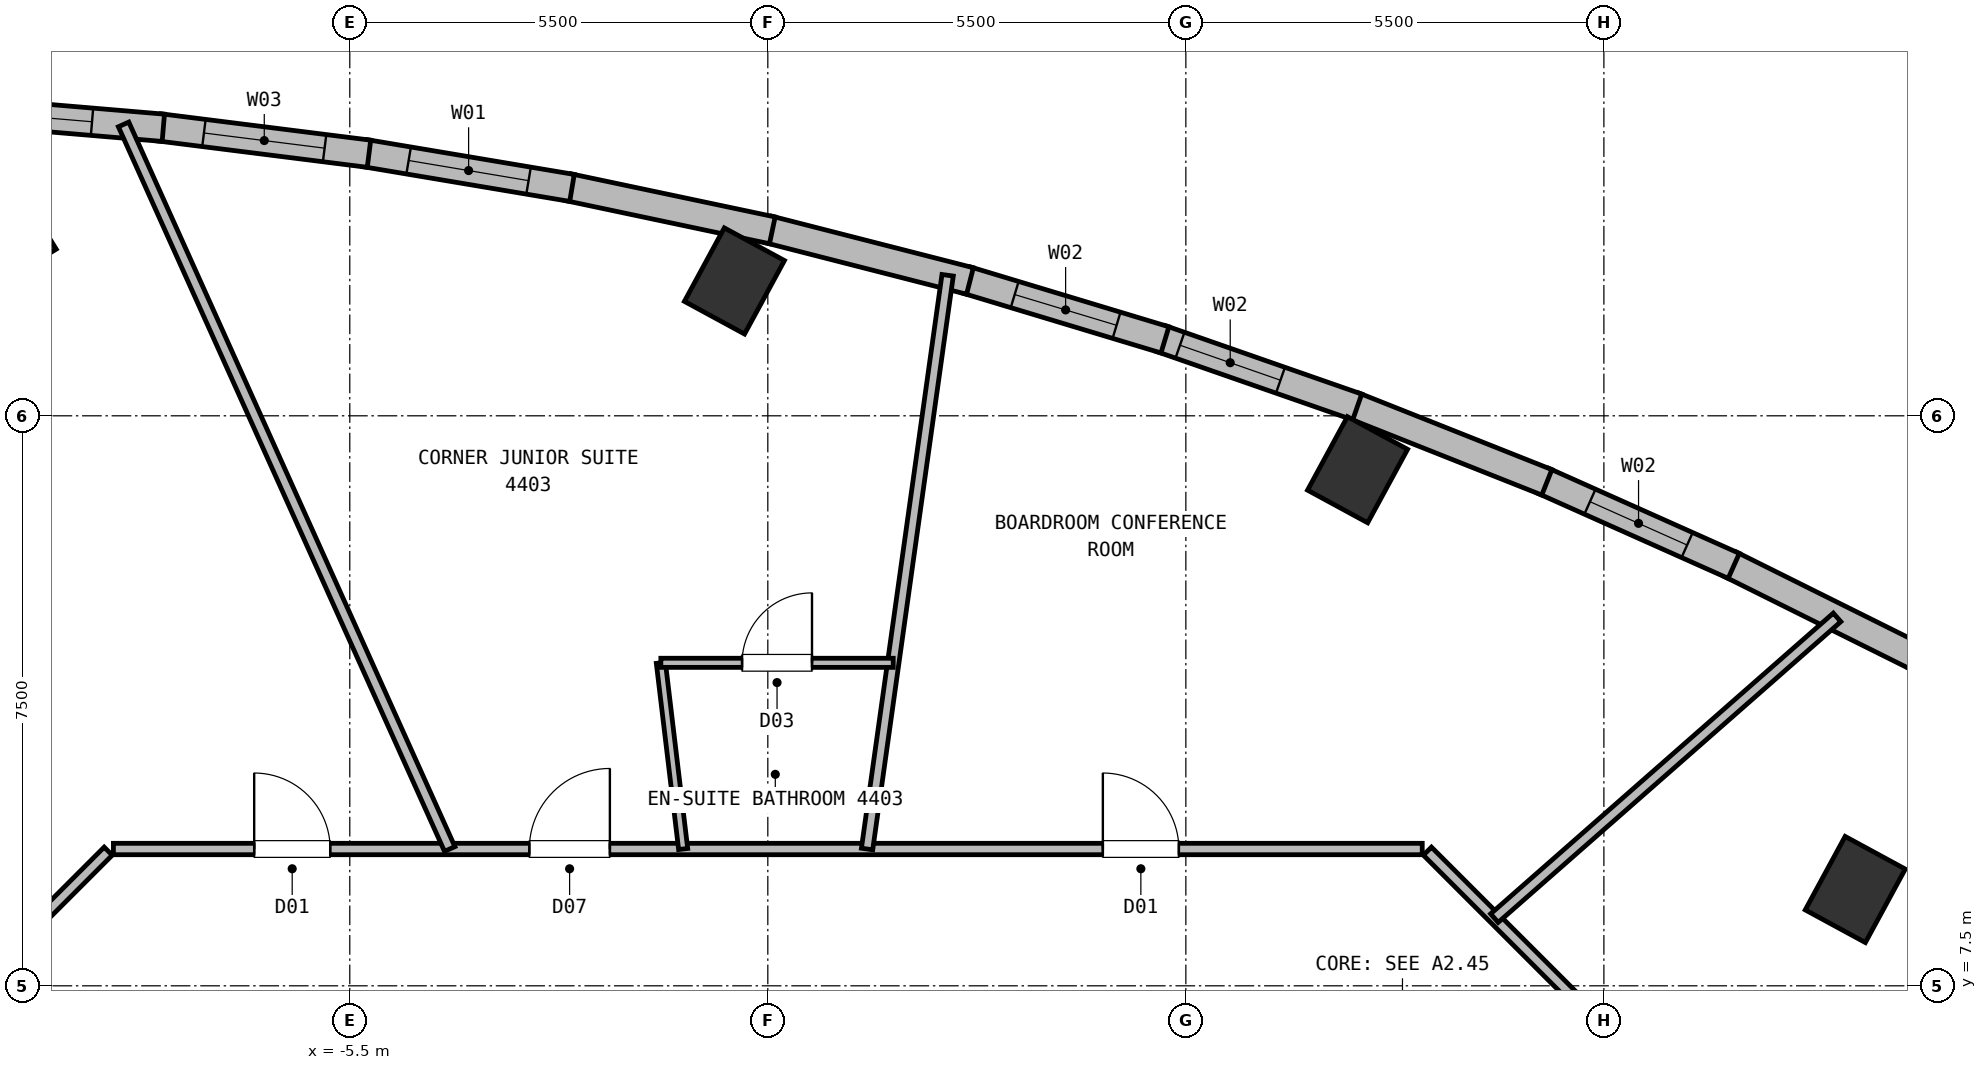
"""IFC4 building model, lengths in metres.
Left out: names, types, materials, properties, quantities, classifications, styles, units other than length and angle.
Written with IfcOpenShell. Run it as: python <this file> out.ifc"""

import sys

from ifc_helpers import new_model, si_unit, direction, frame, frame_2d, origin, origin_2d, place, context, subcontext, project, spatial, rectangle, extrude, element, fill, save


model = new_model("IFC4")
c1 = context("Model", 3, precision=1e-05, world=origin(), true_north=direction((0.0, 1.0)))
c2 = subcontext(c1, "Body", "Model", "MODEL_VIEW")
j1 = project(units=[si_unit("LENGTHUNIT", "METRE"), si_unit("PLANEANGLEUNIT", "RADIAN")], contexts=[c1])
p1 = place(None, origin())
s1 = spatial("IfcSite", under=j1, at=p1, CompositionType="ELEMENT")
p2 = place(p1, origin())
s2 = spatial("IfcBuilding", under=s1, at=p2, CompositionType="ELEMENT")
p3 = place(p2, frame((0.0, 0.0, 164.75)))
s3 = spatial("IfcBuildingStorey", under=s2, at=p3, CompositionType="ELEMENT", Elevation=164.75)
p4 = place(p3, frame((-10.633, 17.352, 0.0), z_axis=(0.0, 0.0, 1.0), x_axis=(-0.522498564716, 0.852640164354, 0.0)))
e1 = element("IfcColumn", 1, at=p4, inside=s3, PredefinedType="COLUMN", context=c2, shape_type="SweptSolid", body=[
    extrude(rectangle(XDim=1.6, YDim=2.0, at=origin_2d()), origin(), (0.0, 0.0, 1.0), 3.75),
])
for number, where, z_axis, x_axis in (
    (2, (14.307, 8.767, 0.0), (0.0, 0.0, 1.0), (-0.879, 0.477, 0.0)),
    (3, (7.759, 14.29, 0.0), (0.0, 0.0, 1.0), (-0.879, 0.477, 0.0)),
    (4, (-0.439, 16.774, 0.0), (0.0, 0.0, 1.0), (-0.879, 0.477, 0.0)),
):
    element("IfcColumn", number, at=place(p3, frame(where, z_axis=z_axis, x_axis=x_axis)), inside=s3, PredefinedType="COLUMN", context=c2, shape_type="SweptSolid", body=[
        extrude(rectangle(XDim=0.9, YDim=1.1, at=origin_2d()), origin(), (0.0, 0.0, 1.0), 3.75),
    ])
p5 = place(p3, frame((12.664, 13.047, 0.0), z_axis=(0.0, 0.0, 1.0), x_axis=(0.89522231214, -0.445619806389, 0.0)))
e5 = element("IfcWall", 5, at=p5, inside=s3, PredefinedType="SOLIDWALL", context=c2, shape_type="SweptSolid", body=[
    extrude(rectangle(XDim=2.759, YDim=0.36, at=frame_2d((1.379, 0.0))), origin(), (0.0, 0.0, 1.0), 3.44),
])
p6 = place(p3, frame((10.203, 14.144, 0.0), z_axis=(0.0, 0.0, 1.0), x_axis=(0.913079911719, -0.407780669987, 0.0)))
e6 = element("IfcWall", 6, at=p6, inside=s3, PredefinedType="SOLIDWALL", context=c2, shape_type="SweptSolid", body=[
    extrude(rectangle(XDim=2.744, YDim=0.36, at=frame_2d((1.372, 0.0))), origin(), (0.0, 0.0, 1.0), 3.44),
])
p7 = place(p6, frame((0.672, 0.0, 0.72)))
e7 = element("IfcOpeningElement", 7, at=p7, cuts=e6, PredefinedType="OPENING", context=c2, shape_type="SweptSolid", body=[
    extrude(rectangle(XDim=1.4, YDim=1.84, at=frame_2d((0.7, 0.92))), frame((0.0, 0.19, 0.0), z_axis=(0.0, -1.0, 0.0), x_axis=(1.0, 0.0, 0.0)), (0.0, 0.0, 1.0), 0.38),
])
p8 = place(p3, frame((7.708, 15.134, 0.0), z_axis=(0.0, 0.0, 1.0), x_axis=(0.929489253477, -0.368849193671, 0.0)))
e8 = element("IfcWall", 8, at=p8, inside=s3, PredefinedType="SOLIDWALL", context=c2, shape_type="SweptSolid", body=[
    extrude(rectangle(XDim=2.734, YDim=0.36, at=frame_2d((1.367, 0.0))), origin(), (0.0, 0.0, 1.0), 3.44),
])
p9 = place(p3, frame((5.177, 16.015, 0.0), z_axis=(0.0, 0.0, 1.0), x_axis=(0.944274551396, -0.329158885018, 0.0)))
e9 = element("IfcWall", 9, at=p9, inside=s3, PredefinedType="SOLIDWALL", context=c2, shape_type="SweptSolid", body=[
    extrude(rectangle(XDim=2.729, YDim=0.36, at=frame_2d((1.365, 0.0))), origin(), (0.0, 0.0, 1.0), 3.44),
])
p10 = place(p9, frame((0.26, 0.0, 0.72)))
e10 = element("IfcOpeningElement", 10, at=p10, cuts=e9, PredefinedType="OPENING", context=c2, shape_type="SweptSolid", body=[
    extrude(rectangle(XDim=1.4, YDim=1.84, at=frame_2d((0.7, 0.92))), frame((0.0, 0.19, 0.0), z_axis=(0.0, -1.0, 0.0), x_axis=(1.0, 0.0, 0.0)), (0.0, 0.0, 1.0), 0.38),
])
p11 = place(p3, frame((2.612, 16.787, 0.0), z_axis=(0.0, 0.0, 1.0), x_axis=(0.957404258556, -0.288750905972, 0.0)))
e11 = element("IfcWall", 11, at=p11, inside=s3, PredefinedType="SOLIDWALL", context=c2, shape_type="SweptSolid", body=[
    extrude(rectangle(XDim=2.729, YDim=0.36, at=frame_2d((1.365, 0.0))), origin(), (0.0, 0.0, 1.0), 3.44),
])
p12 = place(p11, frame((0.665, 0.0, 0.72)))
e12 = element("IfcOpeningElement", 12, at=p12, cuts=e11, PredefinedType="OPENING", context=c2, shape_type="SweptSolid", body=[
    extrude(rectangle(XDim=1.4, YDim=1.84, at=frame_2d((0.7, 0.92))), frame((0.0, 0.19, 0.0), z_axis=(0.0, -1.0, 0.0), x_axis=(1.0, 0.0, 0.0)), (0.0, 0.0, 1.0), 0.38),
])
p13 = place(p3, frame((0.01, 17.452, 0.0), z_axis=(0.0, 0.0, 1.0), x_axis=(0.968799214678, -0.247846891526, 0.0)))
e13 = element("IfcWall", 13, at=p13, inside=s3, PredefinedType="SOLIDWALL", context=c2, shape_type="SweptSolid", body=[
    extrude(rectangle(XDim=2.734, YDim=0.36, at=frame_2d((1.367, 0.0))), origin(), (0.0, 0.0, 1.0), 3.44),
])
p14 = place(p3, frame((-2.625, 18.008, 0.0), z_axis=(0.0, 0.0, 1.0), x_axis=(0.978369100094, -0.20686687502, 0.0)))
e14 = element("IfcWall", 14, at=p14, inside=s3, PredefinedType="SOLIDWALL", context=c2, shape_type="SweptSolid", body=[
    extrude(rectangle(XDim=2.744, YDim=0.36, at=frame_2d((1.372, 0.0))), origin(), (0.0, 0.0, 1.0), 3.44),
])
p15 = place(p3, frame((-5.297, 18.455, 0.0), z_axis=(0.0, 0.0, 1.0), x_axis=(0.986180213116, -0.16567615175, 0.0)))
e15 = element("IfcWall", 15, at=p15, inside=s3, PredefinedType="SOLIDWALL", context=c2, shape_type="SweptSolid", body=[
    extrude(rectangle(XDim=2.759, YDim=0.36, at=frame_2d((1.379, 0.0))), origin(), (0.0, 0.0, 1.0), 3.44),
])
p16 = place(p15, frame((0.579, 0.0, 0.72)))
e16 = element("IfcOpeningElement", 16, at=p16, cuts=e15, PredefinedType="OPENING", context=c2, shape_type="SweptSolid", body=[
    extrude(rectangle(XDim=1.6, YDim=1.88, at=frame_2d((0.8, 0.94))), frame((0.0, 0.19, 0.0), z_axis=(0.0, -1.0, 0.0), x_axis=(1.0, 0.0, 0.0)), (0.0, 0.0, 1.0), 0.38),
])
p17 = place(p3, frame((-8.003, 18.795, 0.0), z_axis=(0.0, 0.0, 1.0), x_axis=(0.992180208289, -0.124813598137, 0.0)))
e17 = element("IfcWall", 17, at=p17, inside=s3, PredefinedType="SOLIDWALL", context=c2, shape_type="SweptSolid", body=[
    extrude(rectangle(XDim=2.778, YDim=0.36, at=frame_2d((1.389, 0.0))), origin(), (0.0, 0.0, 1.0), 3.44),
])
p18 = place(p17, frame((0.589, 0.0, 0.72)))
e18 = element("IfcOpeningElement", 18, at=p18, cuts=e17, PredefinedType="OPENING", context=c2, shape_type="SweptSolid", body=[
    extrude(rectangle(XDim=1.6, YDim=1.88, at=frame_2d((0.8, 0.94))), frame((0.0, 0.19, 0.0), z_axis=(0.0, -1.0, 0.0), x_axis=(1.0, 0.0, 0.0)), (0.0, 0.0, 1.0), 0.38),
])
p19 = place(p3, frame((-10.745, 19.026, 0.0), z_axis=(0.0, 0.0, 1.0), x_axis=(0.996434889396, -0.084365343561, 0.0)))
e19 = element("IfcWall", 19, at=p19, inside=s3, PredefinedType="SOLIDWALL", context=c2, shape_type="SweptSolid", body=[
    extrude(rectangle(XDim=2.801, YDim=0.36, at=frame_2d((1.401, 0.0))), origin(), (0.0, 0.0, 1.0), 3.44),
])
p20 = place(p19, frame((0.26, 0.0, 0.72)))
e20 = element("IfcOpeningElement", 20, at=p20, cuts=e19, PredefinedType="OPENING", context=c2, shape_type="SweptSolid", body=[
    extrude(rectangle(XDim=1.6, YDim=1.88, at=frame_2d((0.8, 0.94))), frame((0.0, 0.19, 0.0), z_axis=(0.0, -1.0, 0.0), x_axis=(1.0, 0.0, 0.0)), (0.0, 0.0, 1.0), 0.38),
])
p21 = place(p3, frame((8.678, 9.272, 0.0), z_axis=(0.0, 0.0, 1.0), x_axis=(0.707106781187, -0.707106781187, 0.0)))
e21 = element("IfcWall", 21, at=p21, inside=s3, PredefinedType="PARTITIONING", context=c2, shape_type="SweptSolid", body=[
    extrude(rectangle(XDim=2.89, YDim=0.15, at=frame_2d((1.445, 0.0))), origin(), (0.0, 0.0, 1.0), 3.44),
])
p22 = place(p3, frame((-8.61, 9.3, 0.0), z_axis=(0.0, 0.0, 1.0), x_axis=(1.0, 0.0, 0.0)))
e22 = element("IfcWall", 22, at=p22, inside=s3, PredefinedType="PARTITIONING", context=c2, shape_type="SweptSolid", body=[
    extrude(rectangle(XDim=17.22, YDim=0.15, at=frame_2d((8.61, 0.0))), origin(), (0.0, 0.0, 1.0), 3.44),
])
p23 = place(p22, frame((5.472, 0.0, 0.0)))
e23 = element("IfcOpeningElement", 23, at=p23, cuts=e22, PredefinedType="OPENING", context=c2, shape_type="SweptSolid", body=[
    extrude(rectangle(XDim=1.06, YDim=2.15, at=frame_2d((0.53, 1.075))), frame((0.0, 0.085, 0.0), z_axis=(0.0, -1.0, 0.0), x_axis=(1.0, 0.0, 0.0)), (0.0, 0.0, 1.0), 0.17),
])
p24 = place(p22, frame((13.018, 0.0, 0.0)))
e24 = element("IfcOpeningElement", 24, at=p24, cuts=e22, PredefinedType="OPENING", context=c2, shape_type="SweptSolid", body=[
    extrude(rectangle(XDim=1.0, YDim=2.15, at=frame_2d((0.5, 1.075))), frame((0.0, 0.085, 0.0), z_axis=(0.0, -1.0, 0.0), x_axis=(1.0, 0.0, 0.0)), (0.0, 0.0, 1.0), 0.17),
])
p25 = place(p22, frame((1.852, 0.0, 0.0)))
e25 = element("IfcOpeningElement", 25, at=p25, cuts=e22, PredefinedType="OPENING", context=c2, shape_type="SweptSolid", body=[
    extrude(rectangle(XDim=1.0, YDim=2.15, at=frame_2d((0.5, 1.075))), frame((0.0, 0.085, 0.0), z_axis=(0.0, -1.0, 0.0), x_axis=(1.0, 0.0, 0.0)), (0.0, 0.0, 1.0), 0.17),
])
p26 = place(p3, frame((-10.722, 7.228, 0.0), z_axis=(0.0, 0.0, 1.0), x_axis=(0.707106781187, 0.707106781187, 0.0)))
e26 = element("IfcWall", 26, at=p26, inside=s3, PredefinedType="PARTITIONING", context=c2, shape_type="SweptSolid", body=[
    extrude(rectangle(XDim=2.89, YDim=0.15, at=frame_2d((1.445, 0.0))), origin(), (0.0, 0.0, 1.0), 3.44),
])
p27 = place(p3, frame((9.56, 8.39, 0.0), z_axis=(0.0, 0.0, 1.0), x_axis=(0.751542092704, 0.659685139209, 0.0)))
e27 = element("IfcWall", 27, at=p27, inside=s3, PredefinedType="PARTITIONING", context=c2, shape_type="SweptSolid", body=[
    extrude(rectangle(XDim=5.999, YDim=0.15, at=frame_2d((3.0, 0.0))), origin(), (0.0, 0.0, 1.0), 3.44),
])
p28 = place(p3, frame((1.306, 9.3, 0.0), z_axis=(0.0, 0.0, 1.0), x_axis=(0.139026648153, 0.990288640298, 0.0)))
e28 = element("IfcWall", 28, at=p28, inside=s3, PredefinedType="PARTITIONING", context=c2, shape_type="SweptSolid", body=[
    extrude(rectangle(XDim=7.623, YDim=0.15, at=frame_2d((3.812, 0.0))), origin(), (0.0, 0.0, 1.0), 3.44),
])
p29 = place(p3, frame((-1.114, 9.3, 0.0), z_axis=(0.0, 0.0, 1.0), x_axis=(-0.118930631187, 0.992902565696, 0.0)))
e29 = element("IfcWall", 29, at=p29, inside=s3, PredefinedType="PARTITIONING", context=c2, shape_type="SweptSolid", body=[
    extrude(rectangle(XDim=2.468, YDim=0.12, at=frame_2d((1.234, 0.0))), origin(), (0.0, 0.0, 1.0), 3.44),
])
p30 = place(p3, frame((-1.407, 11.75, 0.0), z_axis=(0.0, 0.0, 1.0), x_axis=(1.0, 0.0, 0.0)))
e30 = element("IfcWall", 30, at=p30, inside=s3, PredefinedType="PARTITIONING", context=c2, shape_type="SweptSolid", body=[
    extrude(rectangle(XDim=3.057, YDim=0.12, at=frame_2d((1.529, 0.0))), origin(), (0.0, 0.0, 1.0), 3.44),
])
p31 = place(p30, frame((1.069, 0.0, 0.0)))
e31 = element("IfcOpeningElement", 31, at=p31, cuts=e30, PredefinedType="OPENING", context=c2, shape_type="SweptSolid", body=[
    extrude(rectangle(XDim=0.92, YDim=2.1, at=frame_2d((0.46, 1.05))), frame((0.0, 0.07, 0.0), z_axis=(0.0, -1.0, 0.0), x_axis=(1.0, 0.0, 0.0)), (0.0, 0.0, 1.0), 0.14),
])
p32 = place(p3, frame((-4.185, 9.3, 0.0), z_axis=(0.0, 0.0, 1.0), x_axis=(-0.41041322582, 0.9118996568, 0.0)))
e32 = element("IfcWall", 32, at=p32, inside=s3, PredefinedType="PARTITIONING", context=c2, shape_type="SweptSolid", body=[
    extrude(rectangle(XDim=10.455, YDim=0.15, at=frame_2d((5.228, 0.0))), origin(), (0.0, 0.0, 1.0), 3.44),
])
p33 = place(p7, origin())
e33 = element("IfcWindow", 33, at=p33, inside=s3, PartitioningType="SINGLE_PANEL", PredefinedType="WINDOW", context=c2, shape_type="SweptSolid", body=[
    extrude(rectangle(XDim=1.4, YDim=1.84, at=frame_2d((0.7, 0.92))), frame((0.0, 0.03, 0.0), z_axis=(0.0, -1.0, 0.0), x_axis=(1.0, 0.0, 0.0)), (0.0, 0.0, 1.0), 0.06),
])
fill(e7, e33)
p34 = place(p10, origin())
e34 = element("IfcWindow", 34, at=p34, inside=s3, PartitioningType="SINGLE_PANEL", PredefinedType="WINDOW", context=c2, shape_type="SweptSolid", body=[
    extrude(rectangle(XDim=1.4, YDim=1.84, at=frame_2d((0.7, 0.92))), frame((0.0, 0.03, 0.0), z_axis=(0.0, -1.0, 0.0), x_axis=(1.0, 0.0, 0.0)), (0.0, 0.0, 1.0), 0.06),
])
fill(e10, e34)
p35 = place(p12, origin())
e35 = element("IfcWindow", 35, at=p35, inside=s3, PartitioningType="SINGLE_PANEL", PredefinedType="WINDOW", context=c2, shape_type="SweptSolid", body=[
    extrude(rectangle(XDim=1.4, YDim=1.84, at=frame_2d((0.7, 0.92))), frame((0.0, 0.03, 0.0), z_axis=(0.0, -1.0, 0.0), x_axis=(1.0, 0.0, 0.0)), (0.0, 0.0, 1.0), 0.06),
])
fill(e12, e35)
p36 = place(p16, origin())
e36 = element("IfcWindow", 36, at=p36, inside=s3, PartitioningType="SINGLE_PANEL", PredefinedType="WINDOW", context=c2, shape_type="SweptSolid", body=[
    extrude(rectangle(XDim=1.6, YDim=1.88, at=frame_2d((0.8, 0.94))), frame((0.0, 0.03, 0.0), z_axis=(0.0, -1.0, 0.0), x_axis=(1.0, 0.0, 0.0)), (0.0, 0.0, 1.0), 0.06),
])
fill(e16, e36)
p37 = place(p18, origin())
e37 = element("IfcWindow", 37, at=p37, inside=s3, PartitioningType="SINGLE_PANEL", PredefinedType="WINDOW", context=c2, shape_type="SweptSolid", body=[
    extrude(rectangle(XDim=1.6, YDim=1.88, at=frame_2d((0.8, 0.94))), frame((0.0, 0.03, 0.0), z_axis=(0.0, -1.0, 0.0), x_axis=(1.0, 0.0, 0.0)), (0.0, 0.0, 1.0), 0.06),
])
fill(e18, e37)
p38 = place(p20, origin())
e38 = element("IfcWindow", 38, at=p38, inside=s3, PartitioningType="SINGLE_PANEL", PredefinedType="WINDOW", context=c2, shape_type="SweptSolid", body=[
    extrude(rectangle(XDim=1.6, YDim=1.88, at=frame_2d((0.8, 0.94))), frame((0.0, 0.03, 0.0), z_axis=(0.0, -1.0, 0.0), x_axis=(1.0, 0.0, 0.0)), (0.0, 0.0, 1.0), 0.06),
])
fill(e20, e38)
p39 = place(p31, origin())
e39 = element("IfcDoor", 39, at=p39, inside=s3, OperationType="SINGLE_SWING_RIGHT", PredefinedType="DOOR", context=c2, shape_type="SweptSolid", body=[
    extrude(rectangle(XDim=0.92, YDim=2.1, at=frame_2d((0.46, 1.05))), frame((0.0, 0.025, 0.0), z_axis=(0.0, -1.0, 0.0), x_axis=(1.0, 0.0, 0.0)), (0.0, 0.0, 1.0), 0.05),
])
fill(e31, e39)
p40 = place(p23, origin())
e40 = element("IfcDoor", 40, at=p40, inside=s3, OperationType="SINGLE_SWING_RIGHT", PredefinedType="DOOR", context=c2, shape_type="SweptSolid", body=[
    extrude(rectangle(XDim=1.06, YDim=2.15, at=frame_2d((0.53, 1.075))), frame((0.0, 0.025, 0.0), z_axis=(0.0, -1.0, 0.0), x_axis=(1.0, 0.0, 0.0)), (0.0, 0.0, 1.0), 0.05),
])
fill(e23, e40)
p41 = place(p24, origin())
e41 = element("IfcDoor", 41, at=p41, inside=s3, OperationType="SINGLE_SWING_LEFT", PredefinedType="DOOR", context=c2, shape_type="SweptSolid", body=[
    extrude(rectangle(XDim=1.0, YDim=2.15, at=frame_2d((0.5, 1.075))), frame((0.0, 0.025, 0.0), z_axis=(0.0, -1.0, 0.0), x_axis=(1.0, 0.0, 0.0)), (0.0, 0.0, 1.0), 0.05),
])
fill(e24, e41)
p42 = place(p25, origin())
e42 = element("IfcDoor", 42, at=p42, inside=s3, OperationType="SINGLE_SWING_LEFT", PredefinedType="DOOR", context=c2, shape_type="SweptSolid", body=[
    extrude(rectangle(XDim=1.0, YDim=2.15, at=frame_2d((0.5, 1.075))), frame((0.0, 0.025, 0.0), z_axis=(0.0, -1.0, 0.0), x_axis=(1.0, 0.0, 0.0)), (0.0, 0.0, 1.0), 0.05),
])
fill(e25, e42)
save(model, sys.argv[1])
